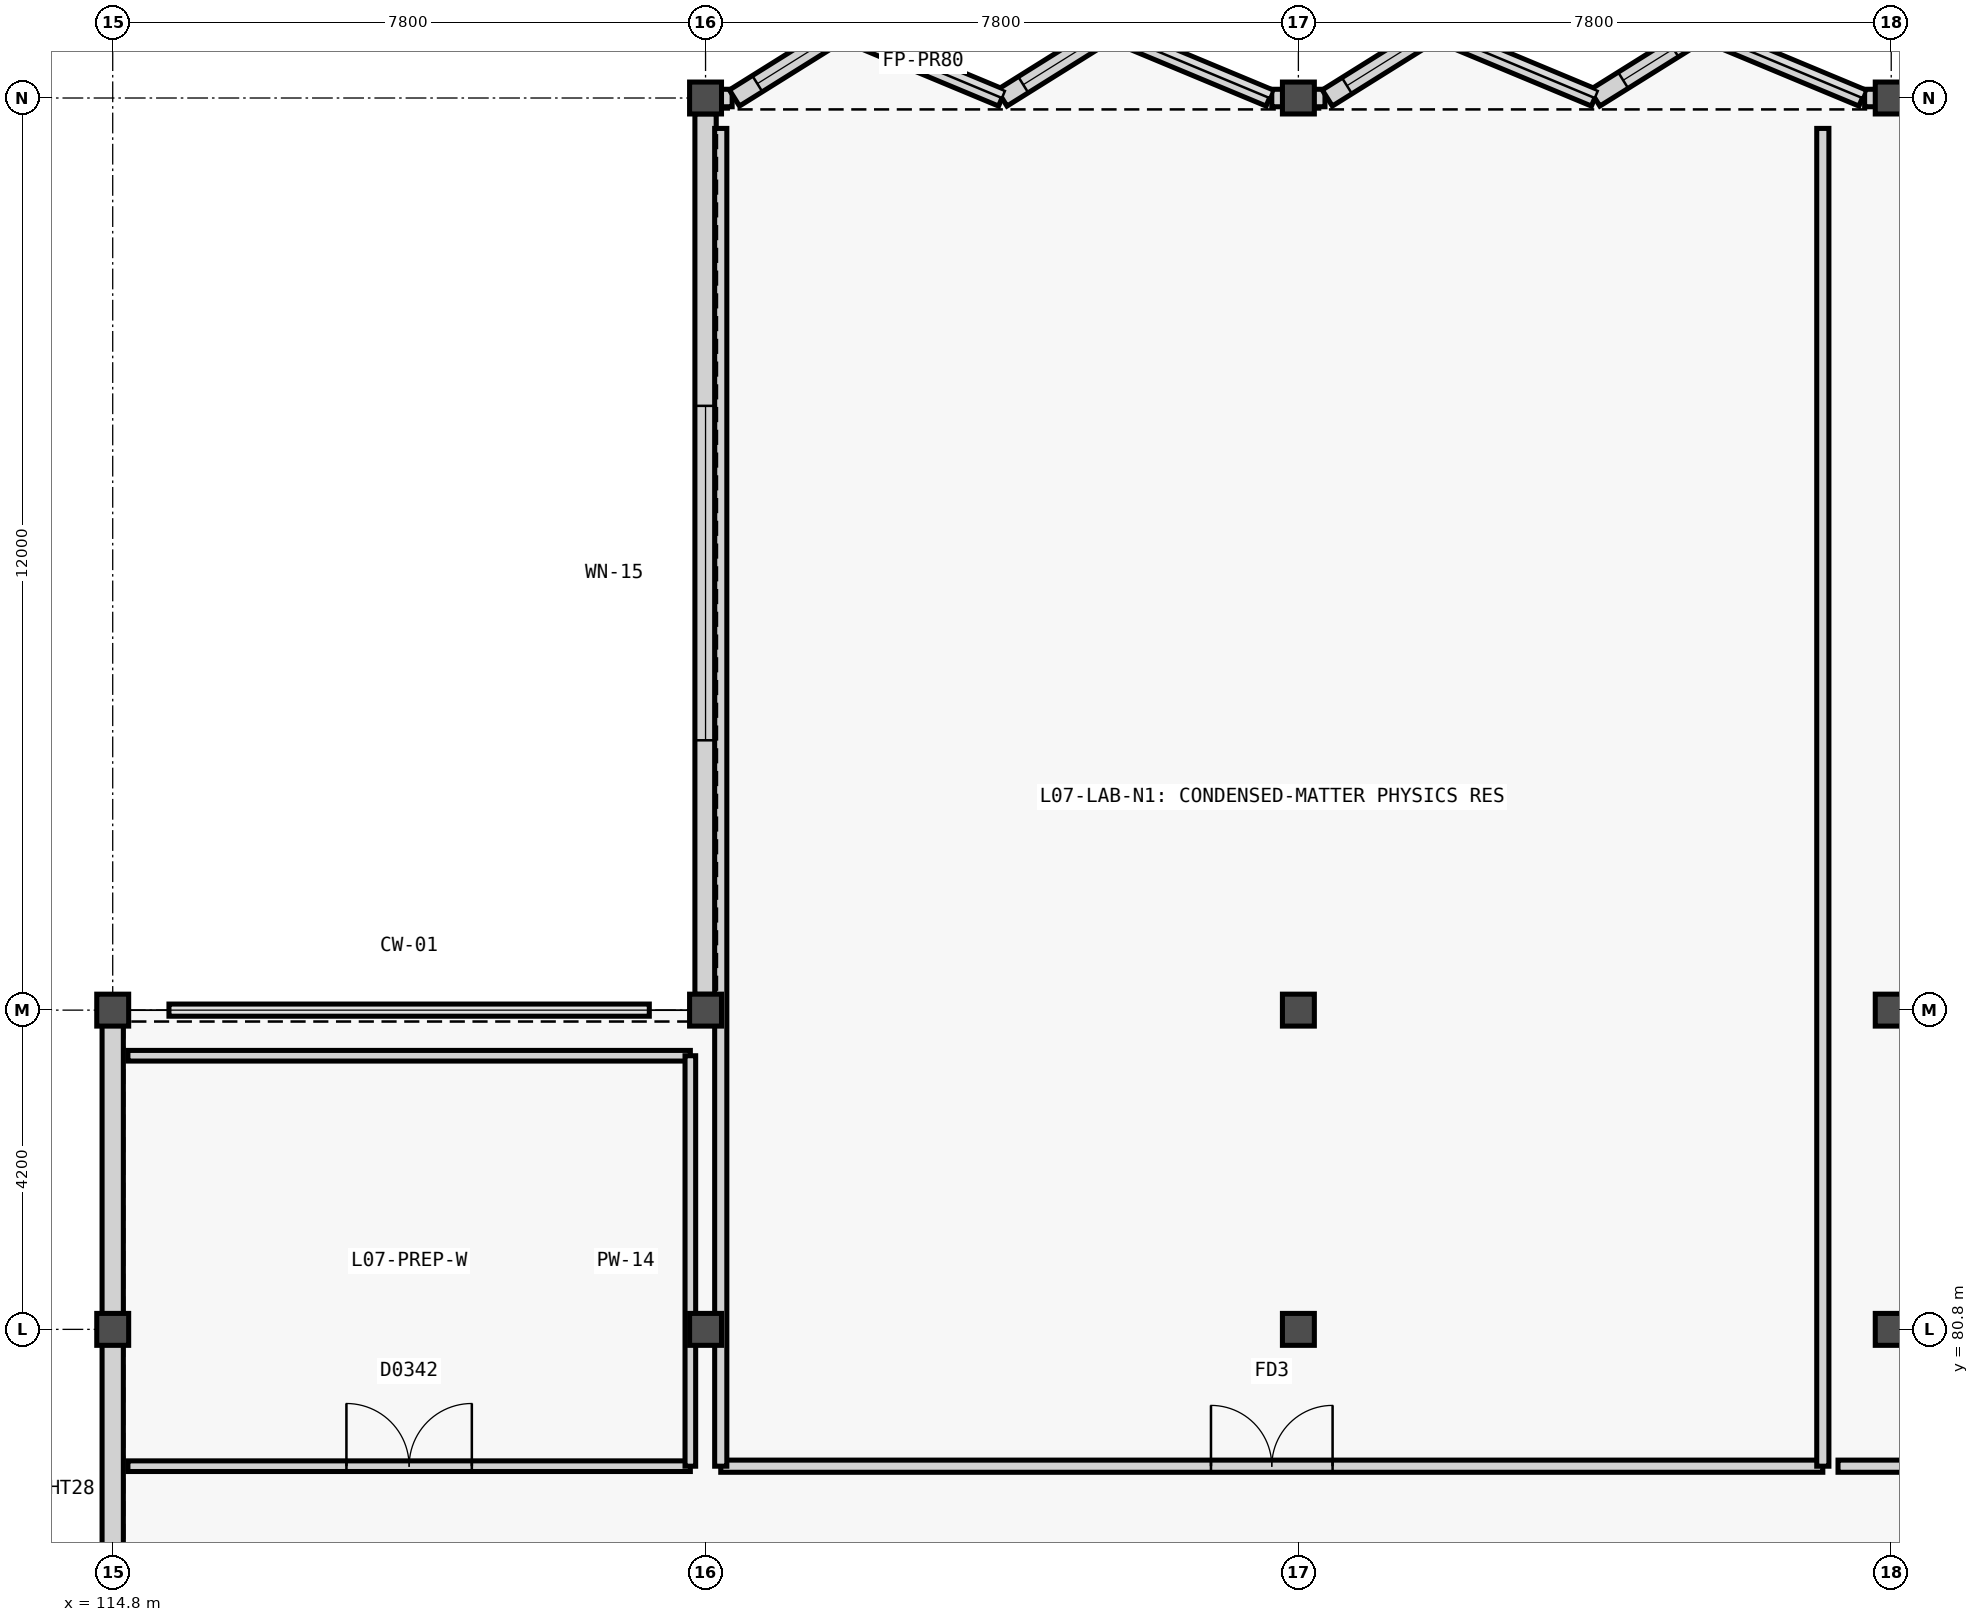
"""IFC4 building model, lengths in metres.
Left out: names, types, materials, properties, quantities, classifications, styles, units other than length and angle.
Written with IfcOpenShell. Run it as: python <this file> out.ifc"""

import sys

from ifc_helpers import new_model, si_unit, direction, frame, frame_2d, origin, origin_2d, place, context, subcontext, project, spatial, rectangle, extrude, element, fill, save


model = new_model("IFC4")
c1 = context("Model", 3, precision=1e-05, world=origin(), true_north=direction((0.0, 1.0)))
c2 = subcontext(c1, "Body", "Model", "MODEL_VIEW")
j1 = project(units=[si_unit("LENGTHUNIT", "METRE"), si_unit("PLANEANGLEUNIT", "RADIAN")], contexts=[c1])
p1 = place(None, origin())
s1 = spatial("IfcSite", under=j1, at=p1, CompositionType="ELEMENT")
p2 = place(p1, origin())
s2 = spatial("IfcBuilding", under=s1, at=p2, CompositionType="ELEMENT")
p3 = place(p2, frame((0.0, 0.0, 28.8)))
s3 = spatial("IfcBuildingStorey", under=s2, at=p3, CompositionType="ELEMENT", Elevation=28.8)
for number, where, z_axis, x_axis in (
    (1, (114.8, 80.8, 0.0), (0.0, 0.0, 1.0), (1.0, 0.0, 0.0)),
    (2, (114.8, 85.0, 0.0), (0.0, 0.0, 1.0), (1.0, 0.0, 0.0)),
    (3, (122.6, 80.8, 0.0), (0.0, 0.0, 1.0), (1.0, 0.0, 0.0)),
    (4, (122.6, 85.0, 0.0), (0.0, 0.0, 1.0), (1.0, 0.0, 0.0)),
    (5, (122.6, 97.0, 0.0), (0.0, 0.0, 1.0), (1.0, 0.0, 0.0)),
    (6, (130.4, 80.8, 0.0), (0.0, 0.0, 1.0), (1.0, 0.0, 0.0)),
    (7, (130.4, 85.0, 0.0), (0.0, 0.0, 1.0), (1.0, 0.0, 0.0)),
    (8, (130.4, 97.0, 0.0), (0.0, 0.0, 1.0), (1.0, 0.0, 0.0)),
    (9, (138.2, 80.8, 0.0), (0.0, 0.0, 1.0), (1.0, 0.0, 0.0)),
    (10, (138.2, 85.0, 0.0), (0.0, 0.0, 1.0), (1.0, 0.0, 0.0)),
    (11, (138.2, 97.0, 0.0), (0.0, 0.0, 1.0), (1.0, 0.0, 0.0)),
):
    element("IfcColumn", number, at=place(p3, frame(where, z_axis=z_axis, x_axis=x_axis)), inside=s3, PredefinedType="COLUMN", context=c2, shape_type="SweptSolid", body=[
        extrude(rectangle(XDim=0.42, YDim=0.42, at=origin_2d()), origin(), (0.0, 0.0, 1.0), 3.6),
    ])
p4 = place(p3, frame((122.6, 85.208, 0.0), z_axis=(0.0, 0.0, 1.0), x_axis=(0.0, 1.0, 0.0)))
e12 = element("IfcWall", 12, at=p4, inside=s3, PredefinedType="SOLIDWALL", context=c2, shape_type="SweptSolid", body=[
    extrude(rectangle(XDim=11.584, YDim=0.28, at=frame_2d((5.792, 0.0))), origin(), (0.0, 0.0, 1.0), 2.88),
])
p5 = place(p4, frame((3.342, 0.0, 0.82)))
e13 = element("IfcOpeningElement", 13, at=p5, cuts=e12, PredefinedType="OPENING", context=c2, shape_type="SweptSolid", body=[
    extrude(rectangle(XDim=4.4, YDim=1.65, at=frame_2d((2.2, 0.825))), frame((0.0, 0.15, 0.0), z_axis=(0.0, -1.0, 0.0), x_axis=(1.0, 0.0, 0.0)), (0.0, 0.0, 1.0), 0.3),
])
p6 = place(p3, frame((114.8, 72.6, 0.0), z_axis=(0.0, 0.0, 1.0), x_axis=(0.0, 1.0, 0.0)))
e14 = element("IfcWall", 14, at=p6, inside=s3, PredefinedType="SOLIDWALL", context=c2, shape_type="SweptSolid", body=[
    extrude(rectangle(XDim=12.2, YDim=0.28, at=frame_2d((6.1, 0.0))), origin(), (0.0, 0.0, 1.0), 2.78),
])
for number, where, z_axis, x_axis in (
    (15, (122.6, 97.0, 0.0), (0.0, 0.0, 1.0), (1.0, 0.0, 0.0)),
    (16, (130.05, 97.0, 0.0), (0.0, 0.0, 1.0), (1.0, 0.0, 0.0)),
):
    element("IfcWall", number, at=place(p3, frame(where, z_axis=z_axis, x_axis=x_axis)), inside=s3, PredefinedType="SOLIDWALL", context=c2, shape_type="SweptSolid", body=[
        extrude(rectangle(XDim=0.35, YDim=0.23, at=frame_2d((0.175, 0.0))), origin(), (0.0, 0.0, 1.0), 3.36),
    ])
p7 = place(p3, frame((130.4, 97.0, 0.0), z_axis=(0.0, 0.0, 1.0), x_axis=(1.0, 0.0, 0.0)))
e17 = element("IfcWall", 17, at=p7, inside=s3, PredefinedType="SOLIDWALL", context=c2, shape_type="SweptSolid", body=[
    extrude(rectangle(XDim=0.35, YDim=0.23, at=frame_2d((0.175, 0.0))), origin(), (0.0, 0.0, 1.0), 3.36),
])
p8 = place(p3, frame((137.85, 97.0, 0.0), z_axis=(0.0, 0.0, 1.0), x_axis=(1.0, 0.0, 0.0)))
e18 = element("IfcWall", 18, at=p8, inside=s3, PredefinedType="SOLIDWALL", context=c2, shape_type="SweptSolid", body=[
    extrude(rectangle(XDim=0.35, YDim=0.23, at=frame_2d((0.175, 0.0))), origin(), (0.0, 0.0, 1.0), 3.36),
])
p9 = place(p3, frame((138.2, 97.0, 0.0), z_axis=(0.0, 0.0, 1.0), x_axis=(1.0, 0.0, 0.0)))
e19 = element("IfcWall", 19, at=p9, inside=s3, PredefinedType="SOLIDWALL", context=c2, shape_type="SweptSolid", body=[
    extrude(rectangle(XDim=0.35, YDim=0.23, at=frame_2d((0.175, 0.0))), origin(), (0.0, 0.0, 1.0), 3.36),
])
p10 = place(p3, frame((122.98, 97.0, 0.0), z_axis=(0.0, 0.0, 1.0), x_axis=(0.848023086369, 0.529959286158, 0.0)))
e20 = element("IfcWall", 20, at=p10, inside=s3, PredefinedType="SOLIDWALL", context=c2, shape_type="SweptSolid", body=[
    extrude(rectangle(XDim=1.66, YDim=0.25, at=frame_2d((0.83, 0.0))), origin(), (0.0, 0.0, 1.0), 3.36),
])
p11 = place(p10, frame((0.355, 0.0, 0.82)))
e21 = element("IfcOpeningElement", 21, at=p11, cuts=e20, PredefinedType="OPENING", context=c2, shape_type="SweptSolid", body=[
    extrude(rectangle(XDim=0.95, YDim=1.5, at=frame_2d((0.475, 0.75))), frame((0.0, 0.135, 0.0), z_axis=(0.0, -1.0, 0.0), x_axis=(1.0, 0.0, 0.0)), (0.0, 0.0, 1.0), 0.27),
])
p12 = place(p3, frame((124.388, 97.88, 0.0), z_axis=(0.0, 0.0, 1.0), x_axis=(0.92309902008, -0.384562347517, 0.0)))
e22 = element("IfcWall", 22, at=p12, inside=s3, PredefinedType="SOLIDWALL", context=c2, shape_type="SweptSolid", body=[
    extrude(rectangle(XDim=2.288, YDim=0.23, at=frame_2d((1.144, 0.0))), origin(), (0.0, 0.0, 1.0), 3.36),
])
p13 = place(p3, frame((126.5, 97.0, 0.0), z_axis=(0.0, 0.0, 1.0), x_axis=(0.848023086369, 0.529959286158, 0.0)))
e23 = element("IfcWall", 23, at=p13, inside=s3, PredefinedType="SOLIDWALL", context=c2, shape_type="SweptSolid", body=[
    extrude(rectangle(XDim=1.66, YDim=0.25, at=frame_2d((0.83, 0.0))), origin(), (0.0, 0.0, 1.0), 3.36),
])
p14 = place(p13, frame((0.33, 0.0, 0.82)))
e24 = element("IfcOpeningElement", 24, at=p14, cuts=e23, PredefinedType="OPENING", context=c2, shape_type="SweptSolid", body=[
    extrude(rectangle(XDim=1.0, YDim=1.35, at=frame_2d((0.5, 0.675))), frame((0.0, 0.135, 0.0), z_axis=(0.0, -1.0, 0.0), x_axis=(1.0, 0.0, 0.0)), (0.0, 0.0, 1.0), 0.27),
])
p15 = place(p3, frame((127.908, 97.88, 0.0), z_axis=(0.0, 0.0, 1.0), x_axis=(0.92309902008, -0.384562347517, 0.0)))
e25 = element("IfcWall", 25, at=p15, inside=s3, PredefinedType="SOLIDWALL", context=c2, shape_type="SweptSolid", body=[
    extrude(rectangle(XDim=2.288, YDim=0.23, at=frame_2d((1.144, 0.0))), origin(), (0.0, 0.0, 1.0), 3.36),
])
p16 = place(p3, frame((130.78, 97.0, 0.0), z_axis=(0.0, 0.0, 1.0), x_axis=(0.848023086369, 0.529959286158, 0.0)))
e26 = element("IfcWall", 26, at=p16, inside=s3, PredefinedType="SOLIDWALL", context=c2, shape_type="SweptSolid", body=[
    extrude(rectangle(XDim=1.66, YDim=0.25, at=frame_2d((0.83, 0.0))), origin(), (0.0, 0.0, 1.0), 3.36),
])
p17 = place(p16, frame((0.305, 0.0, 0.82)))
e27 = element("IfcOpeningElement", 27, at=p17, cuts=e26, PredefinedType="OPENING", context=c2, shape_type="SweptSolid", body=[
    extrude(rectangle(XDim=1.05, YDim=1.4, at=frame_2d((0.525, 0.7))), frame((0.0, 0.135, 0.0), z_axis=(0.0, -1.0, 0.0), x_axis=(1.0, 0.0, 0.0)), (0.0, 0.0, 1.0), 0.27),
])
p18 = place(p3, frame((132.188, 97.88, 0.0), z_axis=(0.0, 0.0, 1.0), x_axis=(0.92309902008, -0.384562347517, 0.0)))
e28 = element("IfcWall", 28, at=p18, inside=s3, PredefinedType="SOLIDWALL", context=c2, shape_type="SweptSolid", body=[
    extrude(rectangle(XDim=2.288, YDim=0.23, at=frame_2d((1.144, 0.0))), origin(), (0.0, 0.0, 1.0), 3.36),
])
p19 = place(p3, frame((134.3, 97.0, 0.0), z_axis=(0.0, 0.0, 1.0), x_axis=(0.848023086369, 0.529959286158, 0.0)))
e29 = element("IfcWall", 29, at=p19, inside=s3, PredefinedType="SOLIDWALL", context=c2, shape_type="SweptSolid", body=[
    extrude(rectangle(XDim=1.66, YDim=0.25, at=frame_2d((0.83, 0.0))), origin(), (0.0, 0.0, 1.0), 3.36),
])
p20 = place(p19, frame((0.44, 0.0, 0.82)))
e30 = element("IfcOpeningElement", 30, at=p20, cuts=e29, PredefinedType="OPENING", context=c2, shape_type="SweptSolid", body=[
    extrude(rectangle(XDim=0.78, YDim=1.3, at=frame_2d((0.39, 0.65))), frame((0.0, 0.135, 0.0), z_axis=(0.0, -1.0, 0.0), x_axis=(1.0, 0.0, 0.0)), (0.0, 0.0, 1.0), 0.27),
])
p21 = place(p3, frame((135.708, 97.88, 0.0), z_axis=(0.0, 0.0, 1.0), x_axis=(0.92309902008, -0.384562347517, 0.0)))
e31 = element("IfcWall", 31, at=p21, inside=s3, PredefinedType="SOLIDWALL", context=c2, shape_type="SweptSolid", body=[
    extrude(rectangle(XDim=2.288, YDim=0.23, at=frame_2d((1.144, 0.0))), origin(), (0.0, 0.0, 1.0), 3.36),
])
p22 = place(p3, frame((115.0, 79.0, 0.0), z_axis=(0.0, 0.0, 1.0), x_axis=(1.0, 0.0, 0.0)))
e32 = element("IfcWall", 32, at=p22, inside=s3, PredefinedType="PARTITIONING", context=c2, shape_type="SweptSolid", body=[
    extrude(rectangle(XDim=7.4, YDim=0.14, at=frame_2d((3.7, 0.0))), origin(), (0.0, 0.0, 1.0), 3.34),
])
p23 = place(p22, frame((2.875, 0.0, 0.0)))
e33 = element("IfcOpeningElement", 33, at=p23, cuts=e32, PredefinedType="OPENING", context=c2, shape_type="SweptSolid", body=[
    extrude(rectangle(XDim=1.65, YDim=2.3, at=frame_2d((0.825, 1.15))), frame((0.0, 0.08, 0.0), z_axis=(0.0, -1.0, 0.0), x_axis=(1.0, 0.0, 0.0)), (0.0, 0.0, 1.0), 0.16),
])
p24 = place(p3, frame((115.0, 84.4, 0.0), z_axis=(0.0, 0.0, 1.0), x_axis=(1.0, 0.0, 0.0)))
e34 = element("IfcWall", 34, at=p24, inside=s3, PredefinedType="PARTITIONING", context=c2, shape_type="SweptSolid", body=[
    extrude(rectangle(XDim=7.4, YDim=0.14, at=frame_2d((3.7, 0.0))), origin(), (0.0, 0.0, 1.0), 3.34),
])
p25 = place(p3, frame((122.4, 79.0, 0.0), z_axis=(0.0, 0.0, 1.0), x_axis=(0.0, 1.0, 0.0)))
e35 = element("IfcWall", 35, at=p25, inside=s3, PredefinedType="PARTITIONING", context=c2, shape_type="SweptSolid", body=[
    extrude(rectangle(XDim=5.4, YDim=0.14, at=frame_2d((2.7, 0.0))), origin(), (0.0, 0.0, 1.0), 2.82),
])
p26 = place(p3, frame((122.8, 79.0, 0.0), z_axis=(0.0, 0.0, 1.0), x_axis=(1.0, 0.0, 0.0)))
e36 = element("IfcWall", 36, at=p26, inside=s3, PredefinedType="PARTITIONING", context=c2, shape_type="SweptSolid", body=[
    extrude(rectangle(XDim=14.5, YDim=0.16, at=frame_2d((7.25, 0.0))), origin(), (0.0, 0.0, 1.0), 3.34),
])
p27 = place(p26, frame((6.45, 0.0, 0.0)))
e37 = element("IfcOpeningElement", 37, at=p27, cuts=e36, PredefinedType="OPENING", context=c2, shape_type="SweptSolid", body=[
    extrude(rectangle(XDim=1.6, YDim=2.2, at=frame_2d((0.8, 1.1))), frame((0.0, 0.09, 0.0), z_axis=(0.0, -1.0, 0.0), x_axis=(1.0, 0.0, 0.0)), (0.0, 0.0, 1.0), 0.18),
])
p28 = place(p3, frame((122.8, 79.0, 0.0), z_axis=(0.0, 0.0, 1.0), x_axis=(0.0, 1.0, 0.0)))
e38 = element("IfcWall", 38, at=p28, inside=s3, PredefinedType="PARTITIONING", context=c2, shape_type="SweptSolid", body=[
    extrude(rectangle(XDim=17.6, YDim=0.16, at=frame_2d((8.8, 0.0))), origin(), (0.0, 0.0, 1.0), 2.82),
])
p29 = place(p3, frame((137.3, 79.0, 0.0), z_axis=(0.0, 0.0, 1.0), x_axis=(0.0, 1.0, 0.0)))
e39 = element("IfcWall", 39, at=p29, inside=s3, PredefinedType="PARTITIONING", context=c2, shape_type="SweptSolid", body=[
    extrude(rectangle(XDim=17.6, YDim=0.16, at=frame_2d((8.8, 0.0))), origin(), (0.0, 0.0, 1.0), 3.34),
])
p30 = place(p3, frame((137.5, 79.0, 0.0), z_axis=(0.0, 0.0, 1.0), x_axis=(1.0, 0.0, 0.0)))
e40 = element("IfcWall", 40, at=p30, inside=s3, PredefinedType="PARTITIONING", context=c2, shape_type="SweptSolid", body=[
    extrude(rectangle(XDim=12.3, YDim=0.16, at=frame_2d((6.15, 0.0))), origin(), (0.0, 0.0, 1.0), 3.34),
])
p31 = place(p30, frame((5.35, 0.0, 0.0)))
e41 = element("IfcOpeningElement", 41, at=p31, cuts=e40, PredefinedType="OPENING", context=c2, shape_type="SweptSolid", body=[
    extrude(rectangle(XDim=1.6, YDim=2.2, at=frame_2d((0.8, 1.1))), frame((0.0, 0.09, 0.0), z_axis=(0.0, -1.0, 0.0), x_axis=(1.0, 0.0, 0.0)), (0.0, 0.0, 1.0), 0.18),
])
p32 = place(p5, origin())
e42 = element("IfcWindow", 42, at=p32, inside=s3, PartitioningType="SINGLE_PANEL", PredefinedType="WINDOW", context=c2, shape_type="SweptSolid", body=[
    extrude(rectangle(XDim=4.4, YDim=1.65, at=frame_2d((2.2, 0.825))), frame((0.0, 0.03, 0.0), z_axis=(0.0, -1.0, 0.0), x_axis=(1.0, 0.0, 0.0)), (0.0, 0.0, 1.0), 0.06),
])
fill(e13, e42)
p33 = place(p11, origin())
e43 = element("IfcWindow", 43, at=p33, inside=s3, PartitioningType="SINGLE_PANEL", PredefinedType="WINDOW", context=c2, shape_type="SweptSolid", body=[
    extrude(rectangle(XDim=0.95, YDim=1.5, at=frame_2d((0.475, 0.75))), frame((0.0, 0.03, 0.0), z_axis=(0.0, -1.0, 0.0), x_axis=(1.0, 0.0, 0.0)), (0.0, 0.0, 1.0), 0.06),
])
fill(e21, e43)
p34 = place(p14, origin())
e44 = element("IfcWindow", 44, at=p34, inside=s3, PartitioningType="SINGLE_PANEL", PredefinedType="WINDOW", context=c2, shape_type="SweptSolid", body=[
    extrude(rectangle(XDim=1.0, YDim=1.35, at=frame_2d((0.5, 0.675))), frame((0.0, 0.03, 0.0), z_axis=(0.0, -1.0, 0.0), x_axis=(1.0, 0.0, 0.0)), (0.0, 0.0, 1.0), 0.06),
])
fill(e24, e44)
p35 = place(p17, origin())
e45 = element("IfcWindow", 45, at=p35, inside=s3, PartitioningType="SINGLE_PANEL", PredefinedType="WINDOW", context=c2, shape_type="SweptSolid", body=[
    extrude(rectangle(XDim=1.05, YDim=1.4, at=frame_2d((0.525, 0.7))), frame((0.0, 0.03, 0.0), z_axis=(0.0, -1.0, 0.0), x_axis=(1.0, 0.0, 0.0)), (0.0, 0.0, 1.0), 0.06),
])
fill(e27, e45)
p36 = place(p20, origin())
e46 = element("IfcWindow", 46, at=p36, inside=s3, PartitioningType="SINGLE_PANEL", PredefinedType="WINDOW", context=c2, shape_type="SweptSolid", body=[
    extrude(rectangle(XDim=0.78, YDim=1.3, at=frame_2d((0.39, 0.65))), frame((0.0, 0.03, 0.0), z_axis=(0.0, -1.0, 0.0), x_axis=(1.0, 0.0, 0.0)), (0.0, 0.0, 1.0), 0.06),
])
fill(e30, e46)
p37 = place(p23, origin())
e47 = element("IfcDoor", 47, at=p37, inside=s3, OperationType="DOUBLE_DOOR_SINGLE_SWING", PredefinedType="DOOR", context=c2, shape_type="SweptSolid", body=[
    extrude(rectangle(XDim=1.65, YDim=2.3, at=frame_2d((0.825, 1.15))), frame((0.0, 0.025, 0.0), z_axis=(0.0, -1.0, 0.0), x_axis=(1.0, 0.0, 0.0)), (0.0, 0.0, 1.0), 0.05),
])
fill(e33, e47)
p38 = place(p27, origin())
e48 = element("IfcDoor", 48, at=p38, inside=s3, OperationType="DOUBLE_DOOR_SINGLE_SWING", PredefinedType="DOOR", context=c2, shape_type="SweptSolid", body=[
    extrude(rectangle(XDim=1.6, YDim=2.2, at=frame_2d((0.8, 1.1))), frame((0.0, 0.025, 0.0), z_axis=(0.0, -1.0, 0.0), x_axis=(1.0, 0.0, 0.0)), (0.0, 0.0, 1.0), 0.05),
])
fill(e37, e48)
save(model, sys.argv[1])
